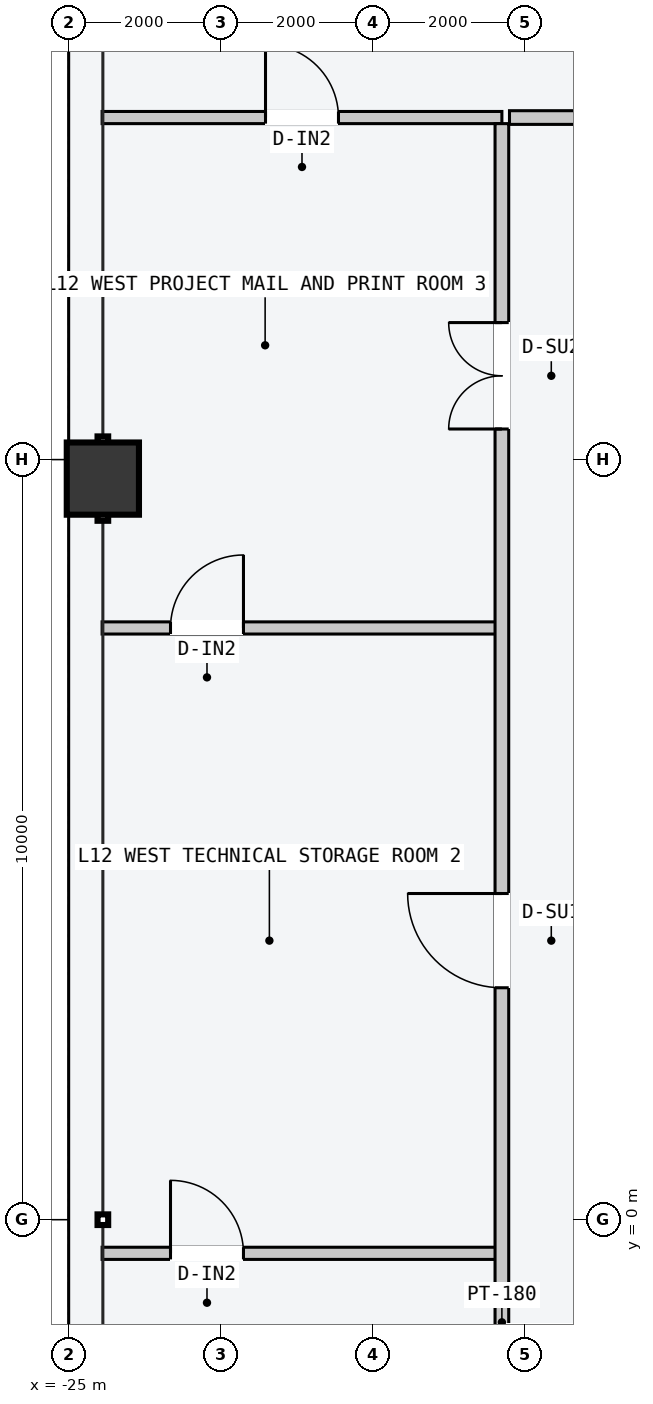
"""IFC4 building model, lengths in metres.
Left out: names, types, materials, properties, quantities, classifications, styles, units other than length and angle.
Written with IfcOpenShell. Run it as: python <this file> out.ifc"""

import sys

from ifc_helpers import new_model, si_unit, direction, frame, frame_2d, origin, origin_2d, place, context, subcontext, project, spatial, rectangle, hollow_rectangle, extrude, element, fill, save


model = new_model("IFC4")
c1 = context("Model", 3, precision=1e-05, world=origin(), true_north=direction((0.0, 1.0)))
c2 = subcontext(c1, "Body", "Model", "MODEL_VIEW")
j1 = project(units=[si_unit("LENGTHUNIT", "METRE"), si_unit("PLANEANGLEUNIT", "RADIAN")], contexts=[c1])
p1 = place(None, origin())
s1 = spatial("IfcSite", under=j1, at=p1, CompositionType="ELEMENT")
p2 = place(p1, origin())
s2 = spatial("IfcBuilding", under=s1, at=p2, CompositionType="ELEMENT")
p3 = place(p2, frame((0.0, 0.0, 49.2)))
s3 = spatial("IfcBuildingStorey", under=s2, at=p3, CompositionType="ELEMENT", Elevation=49.2)
p4 = place(p3, frame((-24.55, 9.75, 0.0), z_axis=(0.0, 0.0, 1.0), x_axis=(0.0, 1.0, 0.0)))
e1 = element("IfcColumn", 1, at=p4, inside=s3, PredefinedType="COLUMN", context=c2, shape_type="SweptSolid", body=[
    extrude(hollow_rectangle(XDim=0.95, YDim=0.95, WallThickness=0.048, at=origin_2d()), origin(), (0.0, 0.0, 1.0), 3.6),
])
p5 = place(p3, frame((-19.2, 14.5, 0.0), z_axis=(0.0, 0.0, 1.0), x_axis=(1.0, 0.0, 0.0)))
e2 = element("IfcWall", 2, at=p5, inside=s3, PredefinedType="PARTITIONING", context=c2, shape_type="SweptSolid", body=[
    extrude(rectangle(XDim=38.4, YDim=0.18, at=frame_2d((19.2, 0.0))), origin(), (0.0, 0.0, 1.0), 3.4),
])
p6 = place(p5, frame((3.515, 0.0, 0.0)))
e3 = element("IfcOpeningElement", 3, at=p6, cuts=e2, PredefinedType="OPENING", context=c2, shape_type="SweptSolid", body=[
    extrude(rectangle(XDim=1.02, YDim=2.2, at=frame_2d((0.51, 1.1))), frame((0.0, 0.1, 0.0), z_axis=(0.0, -1.0, 0.0), x_axis=(1.0, 0.0, 0.0)), (0.0, 0.0, 1.0), 0.2),
])
p7 = place(p5, frame((14.091, 0.0, 0.0)))
e4 = element("IfcOpeningElement", 4, at=p7, cuts=e2, PredefinedType="OPENING", context=c2, shape_type="SweptSolid", body=[
    extrude(rectangle(XDim=1.06, YDim=2.2, at=frame_2d((0.53, 1.1))), frame((0.0, 0.1, 0.0), z_axis=(0.0, -1.0, 0.0), x_axis=(1.0, 0.0, 0.0)), (0.0, 0.0, 1.0), 0.2),
])
p8 = place(p5, frame((24.752, 0.0, 0.0)))
e5 = element("IfcOpeningElement", 5, at=p8, cuts=e2, PredefinedType="OPENING", context=c2, shape_type="SweptSolid", body=[
    extrude(rectangle(XDim=1.24, YDim=2.24, at=frame_2d((0.62, 1.12))), frame((0.0, 0.1, 0.0), z_axis=(0.0, -1.0, 0.0), x_axis=(1.0, 0.0, 0.0)), (0.0, 0.0, 1.0), 0.2),
])
p9 = place(p5, frame((33.277, 0.0, 0.0)))
e6 = element("IfcOpeningElement", 6, at=p9, cuts=e2, PredefinedType="OPENING", context=c2, shape_type="SweptSolid", body=[
    extrude(rectangle(XDim=1.4, YDim=2.2, at=frame_2d((0.7, 1.1))), frame((0.0, 0.1, 0.0), z_axis=(0.0, -1.0, 0.0), x_axis=(1.0, 0.0, 0.0)), (0.0, 0.0, 1.0), 0.2),
])
p10 = place(p3, frame((-24.56, 14.5, 0.0), z_axis=(0.0, 0.0, 1.0), x_axis=(1.0, 0.0, 0.0)))
e7 = element("IfcWall", 7, at=p10, inside=s3, PredefinedType="PARTITIONING", context=c2, shape_type="SweptSolid", body=[
    extrude(rectangle(XDim=5.26, YDim=0.16, at=frame_2d((2.63, 0.0))), origin(), (0.0, 0.0, 1.0), 3.4),
])
p11 = place(p10, frame((2.15, 0.0, 0.0)))
e8 = element("IfcOpeningElement", 8, at=p11, cuts=e7, PredefinedType="OPENING", context=c2, shape_type="SweptSolid", body=[
    extrude(rectangle(XDim=0.96, YDim=2.18, at=frame_2d((0.48, 1.09))), frame((0.0, 0.09, 0.0), z_axis=(0.0, -1.0, 0.0), x_axis=(1.0, 0.0, 0.0)), (0.0, 0.0, 1.0), 0.18),
])
p12 = place(p3, frame((-24.56, -0.442, 0.0), z_axis=(0.0, 0.0, 1.0), x_axis=(1.0, 0.0, 0.0)))
e9 = element("IfcWall", 9, at=p12, inside=s3, PredefinedType="PARTITIONING", context=c2, shape_type="SweptSolid", body=[
    extrude(rectangle(XDim=5.2, YDim=0.16, at=frame_2d((2.6, 0.0))), origin(), (0.0, 0.0, 1.0), 3.4),
])
p13 = place(p12, frame((0.9, 0.0, 0.0)))
e10 = element("IfcOpeningElement", 10, at=p13, cuts=e9, PredefinedType="OPENING", context=c2, shape_type="SweptSolid", body=[
    extrude(rectangle(XDim=0.96, YDim=2.18, at=frame_2d((0.48, 1.09))), frame((0.0, 0.09, 0.0), z_axis=(0.0, -1.0, 0.0), x_axis=(1.0, 0.0, 0.0)), (0.0, 0.0, 1.0), 0.18),
])
p14 = place(p3, frame((-24.56, 7.785, 0.0), z_axis=(0.0, 0.0, 1.0), x_axis=(1.0, 0.0, 0.0)))
e11 = element("IfcWall", 11, at=p14, inside=s3, PredefinedType="PARTITIONING", context=c2, shape_type="SweptSolid", body=[
    extrude(rectangle(XDim=5.2, YDim=0.16, at=frame_2d((2.6, 0.0))), origin(), (0.0, 0.0, 1.0), 3.4),
])
p15 = place(p14, frame((0.9, 0.0, 0.0)))
e12 = element("IfcOpeningElement", 12, at=p15, cuts=e11, PredefinedType="OPENING", context=c2, shape_type="SweptSolid", body=[
    extrude(rectangle(XDim=0.96, YDim=2.18, at=frame_2d((0.48, 1.09))), frame((0.0, 0.09, 0.0), z_axis=(0.0, -1.0, 0.0), x_axis=(1.0, 0.0, 0.0)), (0.0, 0.0, 1.0), 0.18),
])
p16 = place(p3, frame((-19.3, -12.12, 0.0), z_axis=(0.0, 0.0, 1.0), x_axis=(0.0, 1.0, 0.0)))
e13 = element("IfcWall", 13, at=p16, inside=s3, PredefinedType="PARTITIONING", context=c2, shape_type="SweptSolid", body=[
    extrude(rectangle(XDim=26.54, YDim=0.18, at=frame_2d((13.27, 0.0))), origin(), (0.0, 0.0, 1.0), 3.4),
])
p17 = place(p16, frame((5.309, 0.0, 0.0)))
e14 = element("IfcOpeningElement", 14, at=p17, cuts=e13, PredefinedType="OPENING", context=c2, shape_type="SweptSolid", body=[
    extrude(rectangle(XDim=1.06, YDim=2.2, at=frame_2d((0.53, 1.1))), frame((0.0, 0.1, 0.0), z_axis=(0.0, -1.0, 0.0), x_axis=(1.0, 0.0, 0.0)), (0.0, 0.0, 1.0), 0.2),
])
p18 = place(p16, frame((15.171, 0.0, 0.0)))
e15 = element("IfcOpeningElement", 15, at=p18, cuts=e13, PredefinedType="OPENING", context=c2, shape_type="SweptSolid", body=[
    extrude(rectangle(XDim=1.24, YDim=2.24, at=frame_2d((0.62, 1.12))), frame((0.0, 0.1, 0.0), z_axis=(0.0, -1.0, 0.0), x_axis=(1.0, 0.0, 0.0)), (0.0, 0.0, 1.0), 0.2),
])
p19 = place(p16, frame((22.522, 0.0, 0.0)))
e16 = element("IfcOpeningElement", 16, at=p19, cuts=e13, PredefinedType="OPENING", context=c2, shape_type="SweptSolid", body=[
    extrude(rectangle(XDim=1.4, YDim=2.2, at=frame_2d((0.7, 1.1))), frame((0.0, 0.1, 0.0), z_axis=(0.0, -1.0, 0.0), x_axis=(1.0, 0.0, 0.0)), (0.0, 0.0, 1.0), 0.2),
])
p20 = place(p11, origin())
e17 = element("IfcDoor", 17, at=p20, inside=s3, OperationType="SINGLE_SWING_LEFT", PredefinedType="DOOR", context=c2, shape_type="SweptSolid", body=[
    extrude(rectangle(XDim=0.96, YDim=2.18, at=frame_2d((0.48, 1.09))), frame((0.0, 0.025, 0.0), z_axis=(0.0, -1.0, 0.0), x_axis=(1.0, 0.0, 0.0)), (0.0, 0.0, 1.0), 0.05),
])
fill(e8, e17)
p21 = place(p13, origin())
e18 = element("IfcDoor", 18, at=p21, inside=s3, OperationType="SINGLE_SWING_LEFT", PredefinedType="DOOR", context=c2, shape_type="SweptSolid", body=[
    extrude(rectangle(XDim=0.96, YDim=2.18, at=frame_2d((0.48, 1.09))), frame((0.0, 0.025, 0.0), z_axis=(0.0, -1.0, 0.0), x_axis=(1.0, 0.0, 0.0)), (0.0, 0.0, 1.0), 0.05),
])
fill(e10, e18)
p22 = place(p15, origin())
e19 = element("IfcDoor", 19, at=p22, inside=s3, OperationType="SINGLE_SWING_RIGHT", PredefinedType="DOOR", context=c2, shape_type="SweptSolid", body=[
    extrude(rectangle(XDim=0.96, YDim=2.18, at=frame_2d((0.48, 1.09))), frame((0.0, 0.025, 0.0), z_axis=(0.0, -1.0, 0.0), x_axis=(1.0, 0.0, 0.0)), (0.0, 0.0, 1.0), 0.05),
])
fill(e12, e19)
p23 = place(p18, origin())
e20 = element("IfcDoor", 20, at=p23, inside=s3, OperationType="SINGLE_SWING_RIGHT", PredefinedType="DOOR", context=c2, shape_type="SweptSolid", body=[
    extrude(rectangle(XDim=1.24, YDim=2.24, at=frame_2d((0.62, 1.12))), frame((0.0, 0.025, 0.0), z_axis=(0.0, -1.0, 0.0), x_axis=(1.0, 0.0, 0.0)), (0.0, 0.0, 1.0), 0.05),
])
fill(e15, e20)
p24 = place(p19, origin())
e21 = element("IfcDoor", 21, at=p24, inside=s3, OperationType="DOUBLE_DOOR_SINGLE_SWING", PredefinedType="DOOR", context=c2, shape_type="SweptSolid", body=[
    extrude(rectangle(XDim=1.4, YDim=2.2, at=frame_2d((0.7, 1.1))), frame((0.0, 0.025, 0.0), z_axis=(0.0, -1.0, 0.0), x_axis=(1.0, 0.0, 0.0)), (0.0, 0.0, 1.0), 0.05),
])
fill(e16, e21)
save(model, sys.argv[1])
